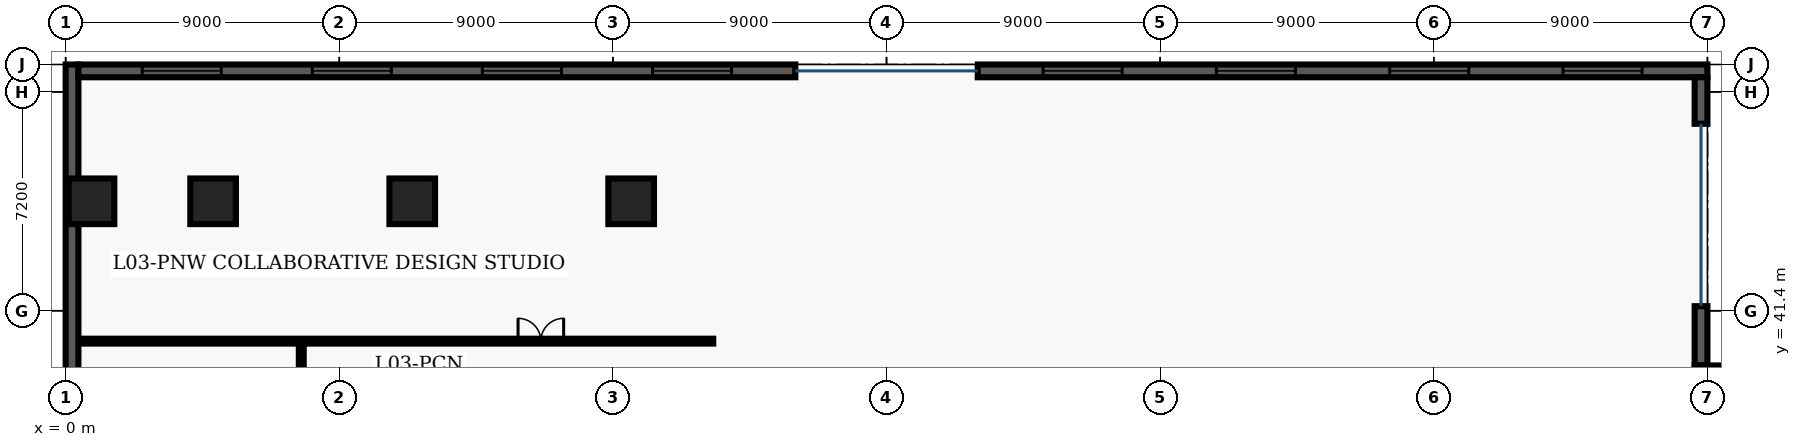
"""IFC4 building model, lengths in metres.
Left out: names, types, materials, properties, quantities, classifications, styles, units other than length and angle.
Written with IfcOpenShell. Run it as: python <this file> out.ifc"""

import sys

from ifc_helpers import new_model, entity, si_unit, converted_unit, direction, frame, origin_with_axes, origin_2d_with_axis, place, context, subcontext, project, spatial, polyline, rectangle, outline, extrude, element, fill, save


model = new_model("IFC4")
c1 = context("Model", 3, precision=1e-05, world=origin_with_axes(), true_north=direction((0.0, 1.0)))
c2 = subcontext(c1, "Body", "Model", "MODEL_VIEW")
j1 = project(units=[si_unit("LENGTHUNIT", "METRE"), converted_unit("PLANEANGLEUNIT", "DEGREE", entity("IfcPlaneAngleMeasure", 0.017), si_unit("PLANEANGLEUNIT", "RADIAN"), dimensions=[0, 0, 0, 0, 0, 0, 0])], contexts=[c1])
p1 = place(None, origin_with_axes())
s1 = spatial("IfcSite", under=j1, at=p1, CompositionType="ELEMENT")
p2 = place(p1, origin_with_axes())
s2 = spatial("IfcBuilding", under=s1, at=p2, CompositionType="ELEMENT")
p3 = place(p2, frame((0.0, 0.0, 15.3), z_axis=(0.0, 0.0, 1.0), x_axis=(1.0, 0.0, 0.0)))
s3 = spatial("IfcBuildingStorey", under=s2, at=p3, CompositionType="ELEMENT", Elevation=15.3)
for number, where, z_axis, x_axis in (
    (1, (11.4, 45.0, 0.0), (0.0, 0.0, 1.0), (1.0, 0.0, 0.0)),
    (2, (18.6, 45.0, 0.0), (0.0, 0.0, 1.0), (1.0, 0.0, 0.0)),
    (3, (4.85, 45.0, 0.0), (0.0, 0.0, 1.0), (1.0, 0.0, 0.0)),
    (4, (0.85, 45.0, 0.0), (0.0, 0.0, 1.0), (1.0, 0.0, 0.0)),
):
    element("IfcColumn", number, at=place(p3, frame(where, z_axis=z_axis, x_axis=x_axis)), inside=s3, PredefinedType="COLUMN", context=c2, shape_type="SweptSolid", body=[
        extrude(rectangle(XDim=1.5, YDim=1.5, at=origin_2d_with_axis()), origin_with_axes(), (0.0, 0.0, 1.0), 4.5),
    ])
p4 = place(p3, frame((0.38, 40.4, 0.0), z_axis=(0.0, 0.0, 1.0), x_axis=(1.0, 0.0, 0.0)))
e5 = element("IfcWall", 5, at=p4, inside=s3, PredefinedType="PARTITIONING", context=c2, shape_type="SweptSolid", body=[
    extrude(outline(polyline([(0.0, -0.08), (20.92, -0.08), (20.92, 0.08), (0.0, 0.08), (0.0, -0.08)])), origin_with_axes(), (0.0, 0.0, 1.0), 3.2),
])
p5 = place(p4, frame((15.25, 0.0, 0.0), z_axis=(0.0, 0.0, 1.0), x_axis=(1.0, 0.0, 0.0)))
e6 = element("IfcOpeningElement", 6, at=p5, cuts=e5, PredefinedType="OPENING", context=c2, shape_type="SweptSolid", body=[
    extrude(rectangle(XDim=1.5, YDim=0.18, at=origin_2d_with_axis()), origin_with_axes(), (0.0, 0.0, 1.0), 2.2),
])
p6 = place(p3, frame((7.75, 7.8, 0.0), z_axis=(0.0, 0.0, 1.0), x_axis=(0.0, 1.0, 0.0)))
e7 = element("IfcWall", 7, at=p6, inside=s3, PredefinedType="PARTITIONING", context=c2, shape_type="SweptSolid", body=[
    extrude(outline(polyline([(0.0, -0.08), (32.6, -0.08), (32.6, 0.08), (0.0, 0.08), (0.0, -0.08)])), origin_with_axes(), (0.0, 0.0, 1.0), 3.2),
])
p7 = place(p6, frame((8.25, 0.0, 0.0), z_axis=(0.0, 0.0, 1.0), x_axis=(1.0, 0.0, 0.0)))
e8 = element("IfcOpeningElement", 8, at=p7, cuts=e7, PredefinedType="OPENING", context=c2, shape_type="SweptSolid", body=[
    extrude(rectangle(XDim=1.5, YDim=0.18, at=origin_2d_with_axis()), origin_with_axes(), (0.0, 0.0, 1.0), 2.2),
])
p8 = place(p6, frame((21.5, 0.0, 0.0), z_axis=(0.0, 0.0, 1.0), x_axis=(1.0, 0.0, 0.0)))
e9 = element("IfcOpeningElement", 9, at=p8, cuts=e7, PredefinedType="OPENING", context=c2, shape_type="SweptSolid", body=[
    extrude(rectangle(XDim=1.0, YDim=0.18, at=origin_2d_with_axis()), origin_with_axes(), (0.0, 0.0, 1.0), 2.15),
])
p9 = place(p3, frame((0.21, 0.42, 0.0), z_axis=(0.0, 0.0, 1.0), x_axis=(0.0, 1.0, 0.0)))
e10 = element("IfcWall", 10, at=p9, inside=s3, PredefinedType="SOLIDWALL", context=c2, shape_type="SweptSolid", body=[
    extrude(outline(polyline([(0.0, -0.21), (49.08, -0.21), (49.08, 0.21), (0.0, 0.21), (0.0, -0.21)])), origin_with_axes(), (0.0, 0.0, 1.0), 4.26),
])
p10 = place(p9, frame((13.9, 0.0, 0.45), z_axis=(0.0, 0.0, 1.0), x_axis=(1.0, 0.0, 0.0)))
e11 = element("IfcOpeningElement", 11, at=p10, cuts=e10, PredefinedType="OPENING", context=c2, shape_type="SweptSolid", body=[
    extrude(rectangle(XDim=2.6, YDim=0.44, at=origin_2d_with_axis()), origin_with_axes(), (0.0, 0.0, 1.0), 2.8),
])
p11 = place(p9, frame((20.07, 0.0, 0.45), z_axis=(0.0, 0.0, 1.0), x_axis=(1.0, 0.0, 0.0)))
e12 = element("IfcOpeningElement", 12, at=p11, cuts=e10, PredefinedType="OPENING", context=c2, shape_type="SweptSolid", body=[
    extrude(rectangle(XDim=2.6, YDim=0.44, at=origin_2d_with_axis()), origin_with_axes(), (0.0, 0.0, 1.0), 2.8),
])
p12 = place(p9, frame((24.54, 0.0, 0.45), z_axis=(0.0, 0.0, 1.0), x_axis=(1.0, 0.0, 0.0)))
e13 = element("IfcOpeningElement", 13, at=p12, cuts=e10, PredefinedType="OPENING", context=c2, shape_type="SweptSolid", body=[
    extrude(rectangle(XDim=2.6, YDim=0.44, at=origin_2d_with_axis()), origin_with_axes(), (0.0, 0.0, 1.0), 2.8),
])
p13 = place(p9, frame((34.73, 0.0, 0.45), z_axis=(0.0, 0.0, 1.0), x_axis=(1.0, 0.0, 0.0)))
e14 = element("IfcOpeningElement", 14, at=p13, cuts=e10, PredefinedType="OPENING", context=c2, shape_type="SweptSolid", body=[
    extrude(rectangle(XDim=2.6, YDim=0.44, at=origin_2d_with_axis()), origin_with_axes(), (0.0, 0.0, 1.0), 2.8),
])
p14 = place(p3, frame((0.42, 49.29, 0.0), z_axis=(0.0, 0.0, 1.0), x_axis=(1.0, 0.0, 0.0)))
e15 = element("IfcWall", 15, at=p14, inside=s3, PredefinedType="SOLIDWALL", context=c2, shape_type="SweptSolid", body=[
    extrude(outline(polyline([(0.0, -0.21), (23.58, -0.21), (23.58, 0.21), (0.0, 0.21), (0.0, -0.21)])), origin_with_axes(), (0.0, 0.0, 1.0), 4.26),
])
p15 = place(p14, frame((3.398, 0.0, 0.45), z_axis=(0.0, 0.0, 1.0), x_axis=(1.0, 0.0, 0.0)))
e16 = element("IfcOpeningElement", 16, at=p15, cuts=e15, PredefinedType="OPENING", context=c2, shape_type="SweptSolid", body=[
    extrude(rectangle(XDim=2.6, YDim=0.44, at=origin_2d_with_axis()), origin_with_axes(), (0.0, 0.0, 1.0), 2.8),
])
p16 = place(p14, frame((8.992, 0.0, 0.45), z_axis=(0.0, 0.0, 1.0), x_axis=(1.0, 0.0, 0.0)))
e17 = element("IfcOpeningElement", 17, at=p16, cuts=e15, PredefinedType="OPENING", context=c2, shape_type="SweptSolid", body=[
    extrude(rectangle(XDim=2.6, YDim=0.44, at=origin_2d_with_axis()), origin_with_axes(), (0.0, 0.0, 1.0), 2.8),
])
p17 = place(p14, frame((14.587, 0.0, 0.45), z_axis=(0.0, 0.0, 1.0), x_axis=(1.0, 0.0, 0.0)))
e18 = element("IfcOpeningElement", 18, at=p17, cuts=e15, PredefinedType="OPENING", context=c2, shape_type="SweptSolid", body=[
    extrude(rectangle(XDim=2.6, YDim=0.44, at=origin_2d_with_axis()), origin_with_axes(), (0.0, 0.0, 1.0), 2.8),
])
p18 = place(p14, frame((20.183, 0.0, 0.45), z_axis=(0.0, 0.0, 1.0), x_axis=(1.0, 0.0, 0.0)))
e19 = element("IfcOpeningElement", 19, at=p18, cuts=e15, PredefinedType="OPENING", context=c2, shape_type="SweptSolid", body=[
    extrude(rectangle(XDim=2.6, YDim=0.44, at=origin_2d_with_axis()), origin_with_axes(), (0.0, 0.0, 1.0), 2.8),
])
p19 = place(p3, frame((30.0, 49.29, 0.0), z_axis=(0.0, 0.0, 1.0), x_axis=(1.0, 0.0, 0.0)))
e20 = element("IfcWall", 20, at=p19, inside=s3, PredefinedType="SOLIDWALL", context=c2, shape_type="SweptSolid", body=[
    extrude(outline(polyline([(0.0, -0.21), (24.0, -0.21), (24.0, 0.21), (0.0, 0.21), (0.0, -0.21)])), origin_with_axes(), (0.0, 0.0, 1.0), 4.26),
])
p20 = place(p19, frame((3.45, 0.0, 0.45), z_axis=(0.0, 0.0, 1.0), x_axis=(1.0, 0.0, 0.0)))
e21 = element("IfcOpeningElement", 21, at=p20, cuts=e20, PredefinedType="OPENING", context=c2, shape_type="SweptSolid", body=[
    extrude(rectangle(XDim=2.6, YDim=0.44, at=origin_2d_with_axis()), origin_with_axes(), (0.0, 0.0, 1.0), 2.8),
])
p21 = place(p19, frame((9.15, 0.0, 0.45), z_axis=(0.0, 0.0, 1.0), x_axis=(1.0, 0.0, 0.0)))
e22 = element("IfcOpeningElement", 22, at=p21, cuts=e20, PredefinedType="OPENING", context=c2, shape_type="SweptSolid", body=[
    extrude(rectangle(XDim=2.6, YDim=0.44, at=origin_2d_with_axis()), origin_with_axes(), (0.0, 0.0, 1.0), 2.8),
])
p22 = place(p19, frame((14.85, 0.0, 0.45), z_axis=(0.0, 0.0, 1.0), x_axis=(1.0, 0.0, 0.0)))
e23 = element("IfcOpeningElement", 23, at=p22, cuts=e20, PredefinedType="OPENING", context=c2, shape_type="SweptSolid", body=[
    extrude(rectangle(XDim=2.6, YDim=0.44, at=origin_2d_with_axis()), origin_with_axes(), (0.0, 0.0, 1.0), 2.8),
])
p23 = place(p19, frame((20.55, 0.0, 0.45), z_axis=(0.0, 0.0, 1.0), x_axis=(1.0, 0.0, 0.0)))
e24 = element("IfcOpeningElement", 24, at=p23, cuts=e20, PredefinedType="OPENING", context=c2, shape_type="SweptSolid", body=[
    extrude(rectangle(XDim=2.6, YDim=0.44, at=origin_2d_with_axis()), origin_with_axes(), (0.0, 0.0, 1.0), 2.8),
])
p24 = place(p3, frame((53.79, 49.08, 0.0), z_axis=(0.0, 0.0, 1.0), x_axis=(0.0, -1.0, 0.0)))
e25 = element("IfcWall", 25, at=p24, inside=s3, PredefinedType="SOLIDWALL", context=c2, shape_type="SweptSolid", body=[
    extrude(outline(polyline([(0.0, -0.21), (1.53, -0.21), (1.53, 0.21), (0.0, 0.21), (0.0, -0.21)])), origin_with_axes(), (0.0, 0.0, 1.0), 4.26),
])
p25 = place(p3, frame((53.79, 41.55, 0.0), z_axis=(0.0, 0.0, 1.0), x_axis=(0.0, -1.0, 0.0)))
e26 = element("IfcWall", 26, at=p25, inside=s3, PredefinedType="SOLIDWALL", context=c2, shape_type="SweptSolid", body=[
    extrude(outline(polyline([(0.0, -0.21), (1.95, -0.21), (1.95, 0.21), (0.0, 0.21), (0.0, -0.21)])), origin_with_axes(), (0.0, 0.0, 1.0), 4.26),
])
p26 = place(p3, frame((53.58, 39.39, 0.0), z_axis=(0.0, 0.0, 1.0), x_axis=(1.0, 0.0, 0.0)))
e27 = element("IfcWall", 27, at=p26, inside=s3, PredefinedType="SOLIDWALL", context=c2, shape_type="SweptSolid", body=[
    extrude(outline(polyline([(0.0, -0.21), (4.62, -0.21), (4.62, 0.21), (0.0, 0.21), (0.0, -0.21)])), origin_with_axes(), (0.0, 0.0, 1.0), 4.26),
])
p27 = place(p26, frame((2.31, 0.0, 0.45), z_axis=(0.0, 0.0, 1.0), x_axis=(1.0, 0.0, 0.0)))
e28 = element("IfcOpeningElement", 28, at=p27, cuts=e27, PredefinedType="OPENING", context=c2, shape_type="SweptSolid", body=[
    extrude(rectangle(XDim=2.6, YDim=0.44, at=origin_2d_with_axis()), origin_with_axes(), (0.0, 0.0, 1.0), 2.8),
])
p28 = place(p4, frame((15.25, 0.0, 0.0), z_axis=(0.0, 0.0, 1.0), x_axis=(1.0, 0.0, 0.0)))
e29 = element("IfcDoor", 29, at=p28, inside=s3, OperationType="DOUBLE_DOOR_SINGLE_SWING", PredefinedType="DOOR", context=c2, shape_type="SweptSolid", body=[
    extrude(rectangle(XDim=1.5, YDim=0.09, at=origin_2d_with_axis()), origin_with_axes(), (0.0, 0.0, 1.0), 2.2),
])
fill(e6, e29)
p29 = place(p14, frame((3.398, 0.0, 0.45), z_axis=(0.0, 0.0, 1.0), x_axis=(1.0, 0.0, 0.0)))
e30 = element("IfcWindow", 30, at=p29, inside=s3, PredefinedType="WINDOW", context=c2, shape_type="SweptSolid", body=[
    extrude(rectangle(XDim=2.6, YDim=0.09, at=origin_2d_with_axis()), origin_with_axes(), (0.0, 0.0, 1.0), 2.8),
])
fill(e16, e30)
p30 = place(p14, frame((8.992, 0.0, 0.45), z_axis=(0.0, 0.0, 1.0), x_axis=(1.0, 0.0, 0.0)))
e31 = element("IfcWindow", 31, at=p30, inside=s3, PredefinedType="WINDOW", context=c2, shape_type="SweptSolid", body=[
    extrude(rectangle(XDim=2.6, YDim=0.09, at=origin_2d_with_axis()), origin_with_axes(), (0.0, 0.0, 1.0), 2.8),
])
fill(e17, e31)
p31 = place(p14, frame((14.587, 0.0, 0.45), z_axis=(0.0, 0.0, 1.0), x_axis=(1.0, 0.0, 0.0)))
e32 = element("IfcWindow", 32, at=p31, inside=s3, PredefinedType="WINDOW", context=c2, shape_type="SweptSolid", body=[
    extrude(rectangle(XDim=2.6, YDim=0.09, at=origin_2d_with_axis()), origin_with_axes(), (0.0, 0.0, 1.0), 2.8),
])
fill(e18, e32)
p32 = place(p14, frame((20.183, 0.0, 0.45), z_axis=(0.0, 0.0, 1.0), x_axis=(1.0, 0.0, 0.0)))
e33 = element("IfcWindow", 33, at=p32, inside=s3, PredefinedType="WINDOW", context=c2, shape_type="SweptSolid", body=[
    extrude(rectangle(XDim=2.6, YDim=0.09, at=origin_2d_with_axis()), origin_with_axes(), (0.0, 0.0, 1.0), 2.8),
])
fill(e19, e33)
p33 = place(p19, frame((3.45, 0.0, 0.45), z_axis=(0.0, 0.0, 1.0), x_axis=(1.0, 0.0, 0.0)))
e34 = element("IfcWindow", 34, at=p33, inside=s3, PredefinedType="WINDOW", context=c2, shape_type="SweptSolid", body=[
    extrude(rectangle(XDim=2.6, YDim=0.09, at=origin_2d_with_axis()), origin_with_axes(), (0.0, 0.0, 1.0), 2.8),
])
fill(e21, e34)
p34 = place(p19, frame((9.15, 0.0, 0.45), z_axis=(0.0, 0.0, 1.0), x_axis=(1.0, 0.0, 0.0)))
e35 = element("IfcWindow", 35, at=p34, inside=s3, PredefinedType="WINDOW", context=c2, shape_type="SweptSolid", body=[
    extrude(rectangle(XDim=2.6, YDim=0.09, at=origin_2d_with_axis()), origin_with_axes(), (0.0, 0.0, 1.0), 2.8),
])
fill(e22, e35)
p35 = place(p19, frame((14.85, 0.0, 0.45), z_axis=(0.0, 0.0, 1.0), x_axis=(1.0, 0.0, 0.0)))
e36 = element("IfcWindow", 36, at=p35, inside=s3, PredefinedType="WINDOW", context=c2, shape_type="SweptSolid", body=[
    extrude(rectangle(XDim=2.6, YDim=0.09, at=origin_2d_with_axis()), origin_with_axes(), (0.0, 0.0, 1.0), 2.8),
])
fill(e23, e36)
p36 = place(p19, frame((20.55, 0.0, 0.45), z_axis=(0.0, 0.0, 1.0), x_axis=(1.0, 0.0, 0.0)))
e37 = element("IfcWindow", 37, at=p36, inside=s3, PredefinedType="WINDOW", context=c2, shape_type="SweptSolid", body=[
    extrude(rectangle(XDim=2.6, YDim=0.09, at=origin_2d_with_axis()), origin_with_axes(), (0.0, 0.0, 1.0), 2.8),
])
fill(e24, e37)
save(model, sys.argv[1])
